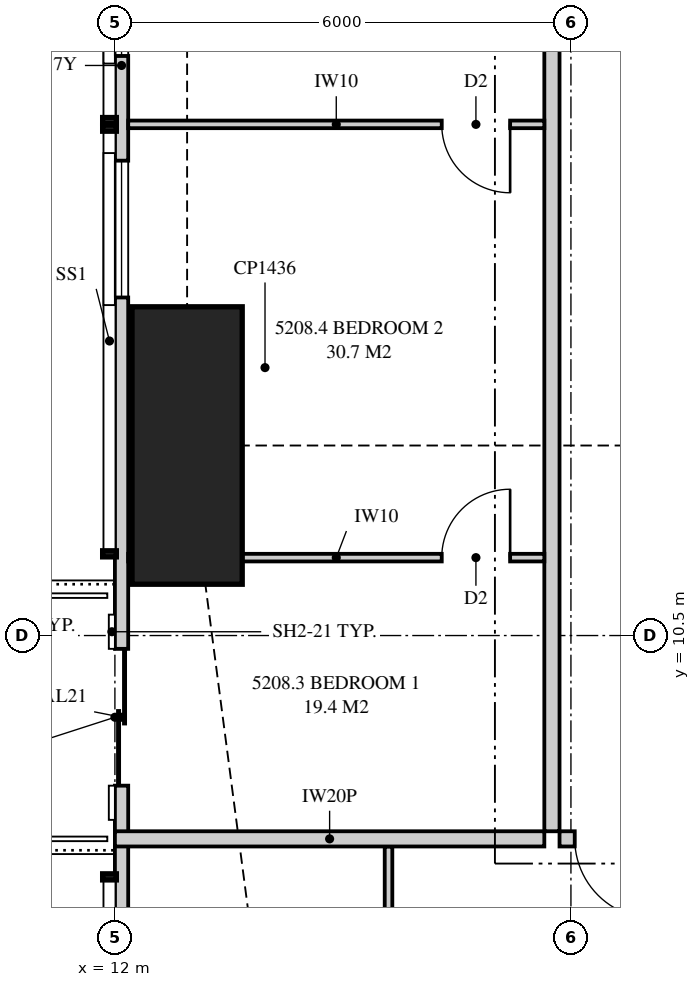
"""IFC4 building model, lengths in metres.
Left out: names, types, materials, properties, quantities, classifications, styles, units other than length and angle.
Written with IfcOpenShell. Run it as: python <this file> out.ifc"""

import sys

from ifc_helpers import new_model, si_unit, direction, frame, frame_2d, origin, origin_2d, place, context, subcontext, project, spatial, polyline, rectangle, outline, extrude, element, fill, save


model = new_model("IFC4")
c1 = context("Model", 3, precision=1e-05, world=origin(), true_north=direction((0.0, 1.0)))
c2 = subcontext(c1, "Body", "Model", "MODEL_VIEW")
j1 = project(units=[si_unit("LENGTHUNIT", "METRE"), si_unit("PLANEANGLEUNIT", "RADIAN")], contexts=[c1])
p1 = place(None, origin())
s1 = spatial("IfcSite", under=j1, at=p1, CompositionType="ELEMENT")
p2 = place(p1, origin())
s2 = spatial("IfcBuilding", under=s1, at=p2, CompositionType="ELEMENT")
p3 = place(p2, frame((0.0, 0.0, 191.2)))
s3 = spatial("IfcBuildingStorey", under=s2, at=p3, CompositionType="ELEMENT", Elevation=191.2)
p4 = place(p3, frame((12.95, 13.0, 0.0), z_axis=(0.0, 0.0, 1.0), x_axis=(1.0, 0.0, 0.0)))
e1 = element("IfcColumn", 1, at=p4, inside=s3, PredefinedType="COLUMN", context=c2, shape_type="SweptSolid", body=[
    extrude(rectangle(XDim=1.45, YDim=3.65, at=origin_2d()), origin(), (0.0, 0.0, 1.0), 3.35),
])
p5 = place(p3, frame((12.087, 32.949, 0.0), z_axis=(0.0, 0.0, 1.0), x_axis=(0.0, -1.0, 0.0)))
e2 = element("IfcWall", 2, at=p5, inside=s3, PredefinedType="SOLIDWALL", context=c2, shape_type="SweptSolid", body=[
    extrude(outline(polyline([(0.0, 0.0), (29.897, 0.0), (29.897, 3.11), (20.191, 3.11), (20.191, 2.15), (20.051, 2.15), (20.051, 3.11), (19.949, 3.11), (19.949, 2.15), (7.949, 2.15), (7.949, 3.11), (7.823, 3.11), (7.823, 2.15), (7.73, 2.15), (7.73, 3.11), (0.0, 3.11), (0.0, 0.0)])), frame((0.0, 0.087, 0.0), z_axis=(0.0, -1.0, 0.0), x_axis=(1.0, 0.0, 0.0)), (0.0, 0.0, 1.0), 0.175),
])
p6 = place(p5, frame((1.599, 0.0, 0.4)))
e3 = element("IfcOpeningElement", 3, at=p6, cuts=e2, PredefinedType="OPENING", context=c2, shape_type="SweptSolid", body=[
    extrude(rectangle(XDim=1.2, YDim=1.7, at=frame_2d((0.6, 0.85))), frame((0.0, 0.097, 0.0), z_axis=(0.0, -1.0, 0.0), x_axis=(1.0, 0.0, 0.0)), (0.0, 0.0, 1.0), 0.195),
])
p7 = place(p5, frame((9.899, 0.0, 0.4)))
e4 = element("IfcOpeningElement", 4, at=p7, cuts=e2, PredefinedType="OPENING", context=c2, shape_type="SweptSolid", body=[
    extrude(rectangle(XDim=1.8, YDim=1.7, at=frame_2d((0.9, 0.85))), frame((0.0, 0.097, 0.0), z_axis=(0.0, -1.0, 0.0), x_axis=(1.0, 0.0, 0.0)), (0.0, 0.0, 1.0), 0.195),
])
p8 = place(p5, frame((13.024, 0.0, 0.4)))
e5 = element("IfcOpeningElement", 5, at=p8, cuts=e2, PredefinedType="OPENING", context=c2, shape_type="SweptSolid", body=[
    extrude(rectangle(XDim=1.8, YDim=1.7, at=frame_2d((0.9, 0.85))), frame((0.0, 0.097, 0.0), z_axis=(0.0, -1.0, 0.0), x_axis=(1.0, 0.0, 0.0)), (0.0, 0.0, 1.0), 0.195),
])
p9 = place(p5, frame((16.201, 0.0, 0.4)))
e6 = element("IfcOpeningElement", 6, at=p9, cuts=e2, PredefinedType="OPENING", context=c2, shape_type="SweptSolid", body=[
    extrude(rectangle(XDim=1.8, YDim=1.7, at=frame_2d((0.9, 0.85))), frame((0.0, 0.097, 0.0), z_axis=(0.0, -1.0, 0.0), x_axis=(1.0, 0.0, 0.0)), (0.0, 0.0, 1.0), 0.195),
])
p10 = place(p5, frame((22.624, 0.0, 0.0)))
e7 = element("IfcOpeningElement", 7, at=p10, cuts=e2, PredefinedType="OPENING", context=c2, shape_type="SweptSolid", body=[
    extrude(rectangle(XDim=1.8, YDim=2.1, at=frame_2d((0.9, 1.05))), frame((0.0, 0.097, 0.0), z_axis=(0.0, -1.0, 0.0), x_axis=(1.0, 0.0, 0.0)), (0.0, 0.0, 1.0), 0.195),
])
p11 = place(p3, frame((17.85, 7.825, 0.0), z_axis=(0.0, 0.0, 1.0), x_axis=(1.0, 0.0, 0.0)))
e8 = element("IfcWall", 8, at=p11, inside=s3, PredefinedType="PARTITIONING", context=c2, shape_type="SweptSolid", body=[
    extrude(outline(polyline([(0.0, 0.0), (5.35, 0.0), (5.35, 3.11), (4.737, 3.11), (4.737, 2.541), (4.062, 2.541), (4.062, 3.11), (0.0, 3.11), (0.0, 0.0)])), frame((0.0, 0.1, 0.0), z_axis=(0.0, -1.0, 0.0), x_axis=(1.0, 0.0, 0.0)), (0.0, 0.0, 1.0), 0.2),
])
p12 = place(p11, frame((0.2, 0.0, 0.0)))
e9 = element("IfcOpeningElement", 9, at=p12, cuts=e8, PredefinedType="OPENING", context=c2, shape_type="SweptSolid", body=[
    extrude(rectangle(XDim=1.05, YDim=2.2, at=frame_2d((0.525, 1.1))), frame((0.0, 0.11, 0.0), z_axis=(0.0, -1.0, 0.0), x_axis=(1.0, 0.0, 0.0)), (0.0, 0.0, 1.0), 0.22),
])
p13 = place(p3, frame((15.6, 0.175, 0.0), z_axis=(0.0, 0.0, 1.0), x_axis=(0.0, 1.0, 0.0)))
e10 = element("IfcWall", 10, at=p13, inside=s3, PredefinedType="PARTITIONING", context=c2, shape_type="SweptSolid", body=[
    extrude(outline(polyline([(0.0, 0.0), (7.55, 0.0), (7.55, 3.11), (2.825, 3.11), (2.825, 2.15), (1.079, 2.15), (1.079, 3.11), (0.0, 3.11), (0.0, 0.0)])), frame((0.0, 0.05, 0.0), z_axis=(0.0, -1.0, 0.0), x_axis=(1.0, 0.0, 0.0)), (0.0, 0.0, 1.0), 0.1),
])
p14 = place(p13, frame((3.7, 0.0, 0.0)))
e11 = element("IfcOpeningElement", 11, at=p14, cuts=e10, PredefinedType="OPENING", context=c2, shape_type="SweptSolid", body=[
    extrude(rectangle(XDim=0.9, YDim=2.1, at=frame_2d((0.45, 1.05))), frame((0.0, 0.06, 0.0), z_axis=(0.0, -1.0, 0.0), x_axis=(1.0, 0.0, 0.0)), (0.0, 0.0, 1.0), 0.12),
])
p15 = place(p3, frame((12.0, 7.825, 0.0), z_axis=(0.0, 0.0, 1.0), x_axis=(1.0, 0.0, 0.0)))
e12 = element("IfcWall", 12, at=p15, inside=s3, PredefinedType="PARTITIONING", context=c2, shape_type="SweptSolid", body=[
    extrude(outline(polyline([(0.0, 0.0), (5.65, 0.0), (5.65, 3.11), (2.547, 3.11), (2.547, 2.15), (0.712, 2.15), (0.712, 3.11), (0.0, 3.11), (0.0, 0.0)])), frame((0.0, 0.1, 0.0), z_axis=(0.0, -1.0, 0.0), x_axis=(1.0, 0.0, 0.0)), (0.0, 0.0, 1.0), 0.2),
])
p16 = place(p3, frame((17.75, 7.925, 0.0), z_axis=(0.0, 0.0, 1.0), x_axis=(0.0, 1.0, 0.0)))
e13 = element("IfcWall", 13, at=p16, inside=s3, PredefinedType="PARTITIONING", context=c2, shape_type="SweptSolid", body=[
    extrude(outline(polyline([(0.0, 0.0), (21.15, 0.0), (21.15, 3.11), (17.412, 3.11), (17.412, 2.541), (16.738, 2.541), (16.738, 3.11), (5.412, 3.11), (5.412, 2.541), (4.738, 2.541), (4.738, 3.11), (0.0, 3.11), (0.0, 0.0)])), frame((0.0, 0.1, 0.0), z_axis=(0.0, -1.0, 0.0), x_axis=(1.0, 0.0, 0.0)), (0.0, 0.0, 1.0), 0.2),
])
p17 = place(p16, frame((16.25, 0.0, 0.0)))
e14 = element("IfcOpeningElement", 14, at=p17, cuts=e13, PredefinedType="OPENING", context=c2, shape_type="SweptSolid", body=[
    extrude(rectangle(XDim=1.05, YDim=2.2, at=frame_2d((0.525, 1.1))), frame((0.0, 0.11, 0.0), z_axis=(0.0, -1.0, 0.0), x_axis=(1.0, 0.0, 0.0)), (0.0, 0.0, 1.0), 0.22),
])
p18 = place(p3, frame((12.175, 11.525, 0.0), z_axis=(0.0, 0.0, 1.0), x_axis=(1.0, 0.0, 0.0)))
e15 = element("IfcWall", 15, at=p18, inside=s3, PredefinedType="PARTITIONING", context=c2, shape_type="SweptSolid", body=[
    extrude(outline(polyline([(0.0, 0.0), (5.475, 0.0), (5.475, 3.11), (1.836, 3.11), (1.836, 2.15), (0.101, 2.15), (0.101, 3.11), (0.0, 3.11), (0.0, 0.0)])), frame((0.0, 0.05, 0.0), z_axis=(0.0, -1.0, 0.0), x_axis=(1.0, 0.0, 0.0)), (0.0, 0.0, 1.0), 0.1),
])
p19 = place(p18, frame((4.125, 0.0, 0.0)))
e16 = element("IfcOpeningElement", 16, at=p19, cuts=e15, PredefinedType="OPENING", context=c2, shape_type="SweptSolid", body=[
    extrude(rectangle(XDim=0.9, YDim=2.1, at=frame_2d((0.45, 1.05))), frame((0.0, 0.06, 0.0), z_axis=(0.0, -1.0, 0.0), x_axis=(1.0, 0.0, 0.0)), (0.0, 0.0, 1.0), 0.12),
])
p20 = place(p3, frame((12.175, 17.225, 0.0), z_axis=(0.0, 0.0, 1.0), x_axis=(1.0, 0.0, 0.0)))
e17 = element("IfcWall", 17, at=p20, inside=s3, PredefinedType="PARTITIONING", context=c2, shape_type="SweptSolid", body=[
    extrude(outline(polyline([(0.0, 0.0), (5.475, 0.0), (5.475, 3.11), (1.635, 3.11), (1.635, 2.15), (0.0, 2.15), (0.0, 3.11), (0.0, 0.0)])), frame((0.0, 0.05, 0.0), z_axis=(0.0, -1.0, 0.0), x_axis=(1.0, 0.0, 0.0)), (0.0, 0.0, 1.0), 0.1),
])
p21 = place(p20, frame((4.125, 0.0, 0.0)))
e18 = element("IfcOpeningElement", 18, at=p21, cuts=e17, PredefinedType="OPENING", context=c2, shape_type="SweptSolid", body=[
    extrude(rectangle(XDim=0.9, YDim=2.1, at=frame_2d((0.45, 1.05))), frame((0.0, 0.06, 0.0), z_axis=(0.0, -1.0, 0.0), x_axis=(1.0, 0.0, 0.0)), (0.0, 0.0, 1.0), 0.12),
])
p22 = place(p8, origin())
e19 = element("IfcWindow", 19, at=p22, inside=s3, PartitioningType="SINGLE_PANEL", PredefinedType="WINDOW", context=c2, shape_type="SweptSolid", body=[
    extrude(rectangle(XDim=1.8, YDim=1.7, at=frame_2d((0.9, 0.85))), frame((0.0, 0.03, 0.0), z_axis=(0.0, -1.0, 0.0), x_axis=(1.0, 0.0, 0.0)), (0.0, 0.0, 1.0), 0.06),
])
fill(e5, e19)
p23 = place(p9, origin())
e20 = element("IfcWindow", 20, at=p23, inside=s3, PartitioningType="SINGLE_PANEL", PredefinedType="WINDOW", context=c2, shape_type="SweptSolid", body=[
    extrude(rectangle(XDim=1.8, YDim=1.7, at=frame_2d((0.9, 0.85))), frame((0.0, 0.03, 0.0), z_axis=(0.0, -1.0, 0.0), x_axis=(1.0, 0.0, 0.0)), (0.0, 0.0, 1.0), 0.06),
])
fill(e6, e20)
p24 = place(p10, origin())
e21 = element("IfcDoor", 21, at=p24, inside=s3, OperationType="SLIDING_TO_LEFT", PredefinedType="DOOR", context=c2, shape_type="SweptSolid", body=[
    extrude(rectangle(XDim=1.8, YDim=2.1, at=frame_2d((0.9, 1.05))), frame((0.0, 0.025, 0.0), z_axis=(0.0, -1.0, 0.0), x_axis=(1.0, 0.0, 0.0)), (0.0, 0.0, 1.0), 0.05),
])
fill(e7, e21)
p25 = place(p12, frame((1.05, 0.0, 0.0), z_axis=(0.0, 0.0, 1.0), x_axis=(-1.0, 0.0, 0.0)))
e22 = element("IfcDoor", 22, at=p25, inside=s3, OperationType="SINGLE_SWING_LEFT", PredefinedType="DOOR", context=c2, shape_type="SweptSolid", body=[
    extrude(rectangle(XDim=1.05, YDim=2.2, at=frame_2d((0.525, 1.1))), frame((0.0, 0.025, 0.0), z_axis=(0.0, -1.0, 0.0), x_axis=(1.0, 0.0, 0.0)), (0.0, 0.0, 1.0), 0.05),
])
fill(e9, e22)
p26 = place(p19, origin())
e23 = element("IfcDoor", 23, at=p26, inside=s3, OperationType="SINGLE_SWING_RIGHT", PredefinedType="DOOR", context=c2, shape_type="SweptSolid", body=[
    extrude(rectangle(XDim=0.9, YDim=2.1, at=frame_2d((0.45, 1.05))), frame((0.0, 0.025, 0.0), z_axis=(0.0, -1.0, 0.0), x_axis=(1.0, 0.0, 0.0)), (0.0, 0.0, 1.0), 0.05),
])
fill(e16, e23)
p27 = place(p21, frame((0.9, 0.0, 0.0), z_axis=(0.0, 0.0, 1.0), x_axis=(-1.0, 0.0, 0.0)))
e24 = element("IfcDoor", 24, at=p27, inside=s3, OperationType="SINGLE_SWING_LEFT", PredefinedType="DOOR", context=c2, shape_type="SweptSolid", body=[
    extrude(rectangle(XDim=0.9, YDim=2.1, at=frame_2d((0.45, 1.05))), frame((0.0, 0.025, 0.0), z_axis=(0.0, -1.0, 0.0), x_axis=(1.0, 0.0, 0.0)), (0.0, 0.0, 1.0), 0.05),
])
fill(e18, e24)
save(model, sys.argv[1])
